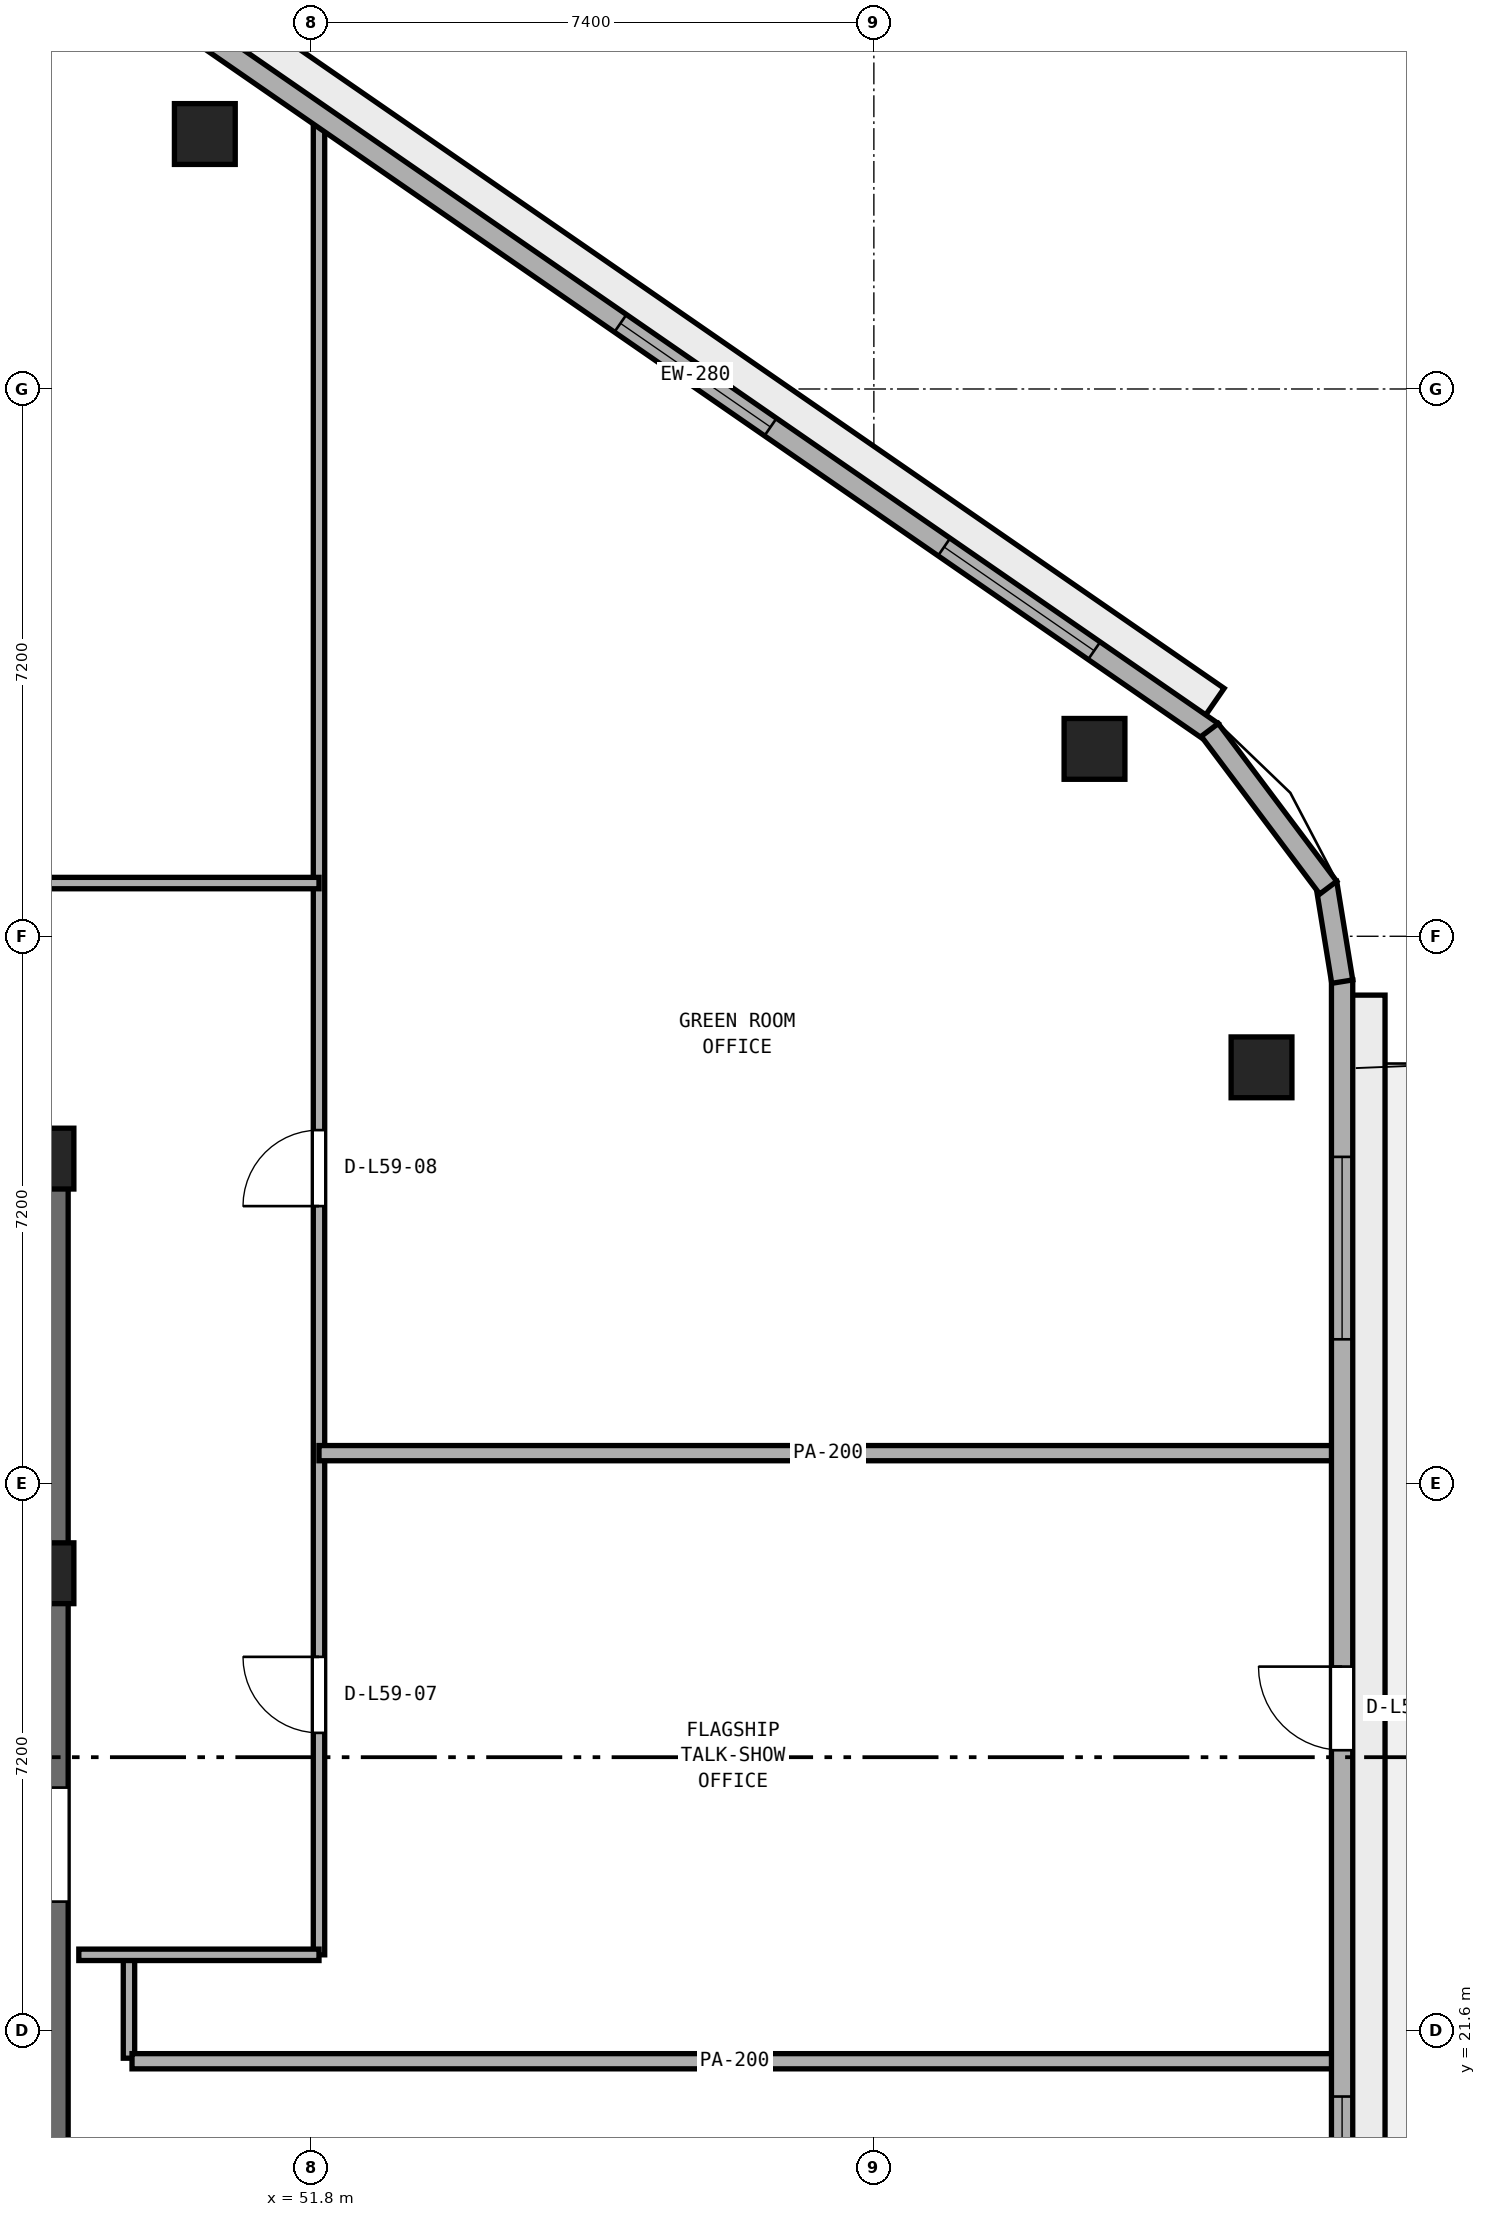
"""IFC4 building model, lengths in metres.
Left out: names, types, materials, properties, quantities, classifications, styles, units other than length and angle.
Written with IfcOpenShell. Run it as: python <this file> out.ifc"""

import sys

from ifc_helpers import new_model, si_unit, direction, frame, frame_2d, origin, origin_2d, place, context, subcontext, project, spatial, rectangle, extrude, element, fill, save


model = new_model("IFC4")
c1 = context("Model", 3, precision=1e-05, world=origin(), true_north=direction((0.0, 1.0)))
c2 = subcontext(c1, "Body", "Model", "MODEL_VIEW")
j1 = project(units=[si_unit("LENGTHUNIT", "METRE"), si_unit("PLANEANGLEUNIT", "RADIAN")], contexts=[c1])
p1 = place(None, origin())
s1 = spatial("IfcSite", under=j1, at=p1, CompositionType="ELEMENT")
p2 = place(p1, origin())
s2 = spatial("IfcBuilding", under=s1, at=p2, CompositionType="ELEMENT")
p3 = place(p2, frame((0.0, 0.0, 232.6)))
s3 = spatial("IfcBuildingStorey", under=s2, at=p3, CompositionType="ELEMENT", Elevation=232.6)
p4 = place(p3, frame((25.4, 33.175, 0.0), z_axis=(0.0, 0.0, 1.0), x_axis=(1.0, 0.0, 0.0)))
e1 = element("IfcWall", 1, at=p4, inside=s3, PredefinedType="SHEAR", context=c2, shape_type="SweptSolid", body=[
    extrude(rectangle(XDim=23.2, YDim=0.45, at=frame_2d((11.6, 0.0))), origin(), (0.0, 0.0, 1.0), 3.51),
])
p5 = place(p3, frame((48.375, 17.45, 0.0), z_axis=(0.0, 0.0, 1.0), x_axis=(0.0, 1.0, 0.0)))
e2 = element("IfcWall", 2, at=p5, inside=s3, PredefinedType="SHEAR", context=c2, shape_type="SweptSolid", body=[
    extrude(rectangle(XDim=15.5, YDim=0.45, at=frame_2d((7.75, 0.0))), origin(), (0.0, 0.0, 1.0), 3.51),
])
p6 = place(p5, frame((5.85, 0.0, 0.0)))
e3 = element("IfcOpeningElement", 3, at=p6, cuts=e2, PredefinedType="OPENING", context=c2, shape_type="SweptSolid", body=[
    extrude(rectangle(XDim=1.5, YDim=2.15, at=frame_2d((0.75, 1.075))), frame((0.0, 0.235, 0.0), z_axis=(0.0, -1.0, 0.0), x_axis=(1.0, 0.0, 0.0)), (0.0, 0.0, 1.0), 0.47),
])
for number, where, z_axis, x_axis in (
    (4, (48.275, 27.62, 0.0), (0.0, 0.0, 1.0), (1.0, 0.0, 0.0)),
    (5, (48.275, 33.075, 0.0), (0.0, 0.0, 1.0), (1.0, 0.0, 0.0)),
):
    element("IfcColumn", number, at=place(p3, frame(where, z_axis=z_axis, x_axis=x_axis)), inside=s3, PredefinedType="PILASTER", context=c2, shape_type="SweptSolid", body=[
        extrude(rectangle(XDim=0.8, YDim=0.8, at=origin_2d()), origin(), (0.0, 0.0, 1.0), 3.8),
    ])
for number, where, z_axis, x_axis in (
    (6, (64.3, 34.276, 0.0), (0.0, 0.0, 1.0), (1.0, 0.0, 0.0)),
    (7, (62.103, 38.465, 0.0), (0.0, 0.0, 1.0), (1.0, 0.0, 0.0)),
    (8, (50.398, 46.554, 0.0), (0.0, 0.0, 1.0), (1.0, 0.0, 0.0)),
):
    element("IfcColumn", number, at=place(p3, frame(where, z_axis=z_axis, x_axis=x_axis)), inside=s3, PredefinedType="COLUMN", context=c2, shape_type="SweptSolid", body=[
        extrude(rectangle(XDim=0.8, YDim=0.8, at=origin_2d()), origin(), (0.0, 0.0, 1.0), 3.8),
    ])
p7 = place(p3, frame((51.9, 22.6, 0.0), z_axis=(0.0, 0.0, 1.0), x_axis=(0.0, 1.0, 0.0)))
e9 = element("IfcWall", 9, at=p7, inside=s3, PredefinedType="PARTITIONING", context=c2, shape_type="SweptSolid", body=[
    extrude(rectangle(XDim=24.235, YDim=0.15, at=frame_2d((12.117, 0.0))), origin(), (0.0, 0.0, 1.0), 3.51),
])
p8 = place(p7, frame((2.92, 0.0, 0.0)))
e10 = element("IfcOpeningElement", 10, at=p8, cuts=e9, PredefinedType="OPENING", context=c2, shape_type="SweptSolid", body=[
    extrude(rectangle(XDim=1.0, YDim=2.12, at=frame_2d((0.5, 1.06))), frame((0.0, 0.085, 0.0), z_axis=(0.0, -1.0, 0.0), x_axis=(1.0, 0.0, 0.0)), (0.0, 0.0, 1.0), 0.17),
])
p9 = place(p7, frame((9.85, 0.0, 0.0)))
e11 = element("IfcOpeningElement", 11, at=p9, cuts=e9, PredefinedType="OPENING", context=c2, shape_type="SweptSolid", body=[
    extrude(rectangle(XDim=1.0, YDim=2.12, at=frame_2d((0.5, 1.06))), frame((0.0, 0.085, 0.0), z_axis=(0.0, -1.0, 0.0), x_axis=(1.0, 0.0, 0.0)), (0.0, 0.0, 1.0), 0.17),
])
p10 = place(p3, frame((49.4, 21.24, 0.0), z_axis=(0.0, 0.0, 1.0), x_axis=(0.0, 1.0, 0.0)))
e12 = element("IfcWall", 12, at=p10, inside=s3, PredefinedType="PARTITIONING", context=c2, shape_type="SweptSolid", body=[
    extrude(rectangle(XDim=1.359, YDim=0.15, at=frame_2d((0.68, 0.0))), origin(), (0.0, 0.0, 1.0), 3.51),
])
p11 = place(p3, frame((49.44, 21.2, 0.0), z_axis=(0.0, 0.0, 1.0), x_axis=(1.0, 0.0, 0.0)))
e13 = element("IfcWall", 13, at=p11, inside=s3, PredefinedType="PARTITIONING", context=c2, shape_type="SweptSolid", body=[
    extrude(rectangle(XDim=15.855, YDim=0.2, at=frame_2d((7.927, 0.0))), origin(), (0.0, 0.0, 1.0), 3.51),
])
p12 = place(p3, frame((48.74, 22.6, 0.0), z_axis=(0.0, 0.0, 1.0), x_axis=(1.0, 0.0, 0.0)))
e14 = element("IfcWall", 14, at=p12, inside=s3, PredefinedType="PARTITIONING", context=c2, shape_type="SweptSolid", body=[
    extrude(rectangle(XDim=3.16, YDim=0.15, at=frame_2d((1.58, 0.0))), origin(), (0.0, 0.0, 1.0), 3.51),
])
p13 = place(p3, frame((51.9, 29.2, 0.0), z_axis=(0.0, 0.0, 1.0), x_axis=(1.0, 0.0, 0.0)))
e15 = element("IfcWall", 15, at=p13, inside=s3, PredefinedType="PARTITIONING", context=c2, shape_type="SweptSolid", body=[
    extrude(rectangle(XDim=13.395, YDim=0.2, at=frame_2d((6.698, 0.0))), origin(), (0.0, 0.0, 1.0), 3.51),
])
p14 = place(p3, frame((38.35, 36.7, 0.0), z_axis=(0.0, 0.0, 1.0), x_axis=(1.0, 0.0, 0.0)))
e16 = element("IfcWall", 16, at=p14, inside=s3, PredefinedType="PARTITIONING", context=c2, shape_type="SweptSolid", body=[
    extrude(rectangle(XDim=13.55, YDim=0.15, at=frame_2d((6.775, 0.0))), origin(), (0.0, 0.0, 1.0), 3.51),
])
p15 = place(p14, frame((6.275, 0.0, 0.0)))
e17 = element("IfcOpeningElement", 17, at=p15, cuts=e16, PredefinedType="OPENING", context=c2, shape_type="SweptSolid", body=[
    extrude(rectangle(XDim=1.0, YDim=2.12, at=frame_2d((0.5, 1.06))), frame((0.0, 0.085, 0.0), z_axis=(0.0, -1.0, 0.0), x_axis=(1.0, 0.0, 0.0)), (0.0, 0.0, 1.0), 0.17),
])
p16 = place(p3, frame((65.36, 16.258, 0.0), z_axis=(0.0, 0.0, 1.0), x_axis=(0.0, 1.0, 0.0)))
e18 = element("IfcWall", 18, at=p16, inside=s3, PredefinedType="STANDARD", context=c2, shape_type="SweptSolid", body=[
    extrude(rectangle(XDim=19.168, YDim=0.28, at=frame_2d((9.584, 0.0))), origin(), (0.0, 0.0, 1.0), 3.51),
])
p17 = place(p16, frame((9.034, 0.0, 0.0)))
e19 = element("IfcOpeningElement", 19, at=p17, cuts=e18, PredefinedType="OPENING", context=c2, shape_type="SweptSolid", body=[
    extrude(rectangle(XDim=1.1, YDim=2.2, at=frame_2d((0.55, 1.1))), frame((0.0, 0.15, 0.0), z_axis=(0.0, -1.0, 0.0), x_axis=(1.0, 0.0, 0.0)), (0.0, 0.0, 1.0), 0.3),
])
p18 = place(p16, frame((2.078, 0.0, 0.9)))
e20 = element("IfcOpeningElement", 20, at=p18, cuts=e18, PredefinedType="OPENING", context=c2, shape_type="SweptSolid", body=[
    extrude(rectangle(XDim=2.4, YDim=1.75, at=frame_2d((1.2, 0.875))), frame((0.0, 0.15, 0.0), z_axis=(0.0, -1.0, 0.0), x_axis=(1.0, 0.0, 0.0)), (0.0, 0.0, 1.0), 0.3),
])
p19 = place(p16, frame((14.44, 0.0, 0.9)))
e21 = element("IfcOpeningElement", 21, at=p19, cuts=e18, PredefinedType="OPENING", context=c2, shape_type="SweptSolid", body=[
    extrude(rectangle(XDim=2.4, YDim=1.75, at=frame_2d((1.2, 0.875))), frame((0.0, 0.15, 0.0), z_axis=(0.0, -1.0, 0.0), x_axis=(1.0, 0.0, 0.0)), (0.0, 0.0, 1.0), 0.3),
])
p20 = place(p3, frame((63.651, 38.683, 0.0), z_axis=(0.0, 0.0, 1.0), x_axis=(-0.822655095, 0.568540759022, 0.0)))
e22 = element("IfcWall", 22, at=p20, inside=s3, PredefinedType="STANDARD", context=c2, shape_type="SweptSolid", body=[
    extrude(rectangle(XDim=16.528, YDim=0.28, at=frame_2d((8.264, 0.0))), origin(), (0.0, 0.0, 1.0), 3.51),
])
p21 = place(p20, frame((1.888, 0.0, 0.9)))
e23 = element("IfcOpeningElement", 23, at=p21, cuts=e22, PredefinedType="OPENING", context=c2, shape_type="SweptSolid", body=[
    extrude(rectangle(XDim=2.4, YDim=1.75, at=frame_2d((1.2, 0.875))), frame((0.0, 0.15, 0.0), z_axis=(0.0, -1.0, 0.0), x_axis=(1.0, 0.0, 0.0)), (0.0, 0.0, 1.0), 0.3),
])
p22 = place(p20, frame((7.064, 0.0, 0.9)))
e24 = element("IfcOpeningElement", 24, at=p22, cuts=e22, PredefinedType="OPENING", context=c2, shape_type="SweptSolid", body=[
    extrude(rectangle(XDim=2.4, YDim=1.75, at=frame_2d((1.2, 0.875))), frame((0.0, 0.15, 0.0), z_axis=(0.0, -1.0, 0.0), x_axis=(1.0, 0.0, 0.0)), (0.0, 0.0, 1.0), 0.3),
])
p23 = place(p3, frame((65.362, 35.403, 0.0), z_axis=(0.0, 0.0, 1.0), x_axis=(-0.160271674114, 0.987072940809, 0.0)))
e25 = element("IfcWall", 25, at=p23, inside=s3, PredefinedType="STANDARD", context=c2, shape_type="SweptSolid", body=[
    extrude(rectangle(XDim=1.315, YDim=0.28, at=frame_2d((0.657, 0.0))), origin(), (0.0, 0.0, 1.0), 3.51),
])
p24 = place(p3, frame((65.177, 36.639, 0.0), z_axis=(0.0, 0.0, 1.0), x_axis=(-0.600436386467, 0.799672524104, 0.0)))
e26 = element("IfcWall", 26, at=p24, inside=s3, PredefinedType="STANDARD", context=c2, shape_type="SweptSolid", body=[
    extrude(rectangle(XDim=2.595, YDim=0.28, at=frame_2d((1.298, 0.0))), origin(), (0.0, 0.0, 1.0), 3.51),
])
p25 = place(p6, origin())
e27 = element("IfcDoor", 27, at=p25, inside=s3, OperationType="DOUBLE_DOOR_SINGLE_SWING", PredefinedType="DOOR", context=c2, shape_type="SweptSolid", body=[
    extrude(rectangle(XDim=1.5, YDim=2.15, at=frame_2d((0.75, 1.075))), frame((0.0, 0.025, 0.0), z_axis=(0.0, -1.0, 0.0), x_axis=(1.0, 0.0, 0.0)), (0.0, 0.0, 1.0), 0.05),
])
fill(e3, e27)
p26 = place(p8, origin())
e28 = element("IfcDoor", 28, at=p26, inside=s3, OperationType="SINGLE_SWING_RIGHT", PredefinedType="DOOR", context=c2, shape_type="SweptSolid", body=[
    extrude(rectangle(XDim=1.0, YDim=2.12, at=frame_2d((0.5, 1.06))), frame((0.0, 0.025, 0.0), z_axis=(0.0, -1.0, 0.0), x_axis=(1.0, 0.0, 0.0)), (0.0, 0.0, 1.0), 0.05),
])
fill(e10, e28)
p27 = place(p9, origin())
e29 = element("IfcDoor", 29, at=p27, inside=s3, OperationType="SINGLE_SWING_LEFT", PredefinedType="DOOR", context=c2, shape_type="SweptSolid", body=[
    extrude(rectangle(XDim=1.0, YDim=2.12, at=frame_2d((0.5, 1.06))), frame((0.0, 0.025, 0.0), z_axis=(0.0, -1.0, 0.0), x_axis=(1.0, 0.0, 0.0)), (0.0, 0.0, 1.0), 0.05),
])
fill(e11, e29)
p28 = place(p17, origin())
e30 = element("IfcDoor", 30, at=p28, inside=s3, OperationType="SINGLE_SWING_RIGHT", PredefinedType="DOOR", context=c2, shape_type="SweptSolid", body=[
    extrude(rectangle(XDim=1.1, YDim=2.2, at=frame_2d((0.55, 1.1))), frame((0.0, 0.025, 0.0), z_axis=(0.0, -1.0, 0.0), x_axis=(1.0, 0.0, 0.0)), (0.0, 0.0, 1.0), 0.05),
])
fill(e19, e30)
p29 = place(p18, origin())
e31 = element("IfcWindow", 31, at=p29, inside=s3, PartitioningType="SINGLE_PANEL", PredefinedType="WINDOW", context=c2, shape_type="SweptSolid", body=[
    extrude(rectangle(XDim=2.4, YDim=1.75, at=frame_2d((1.2, 0.875))), frame((0.0, 0.03, 0.0), z_axis=(0.0, -1.0, 0.0), x_axis=(1.0, 0.0, 0.0)), (0.0, 0.0, 1.0), 0.06),
])
fill(e20, e31)
p30 = place(p19, origin())
e32 = element("IfcWindow", 32, at=p30, inside=s3, PartitioningType="SINGLE_PANEL", PredefinedType="WINDOW", context=c2, shape_type="SweptSolid", body=[
    extrude(rectangle(XDim=2.4, YDim=1.75, at=frame_2d((1.2, 0.875))), frame((0.0, 0.03, 0.0), z_axis=(0.0, -1.0, 0.0), x_axis=(1.0, 0.0, 0.0)), (0.0, 0.0, 1.0), 0.06),
])
fill(e21, e32)
p31 = place(p21, origin())
e33 = element("IfcWindow", 33, at=p31, inside=s3, PartitioningType="SINGLE_PANEL", PredefinedType="WINDOW", context=c2, shape_type="SweptSolid", body=[
    extrude(rectangle(XDim=2.4, YDim=1.75, at=frame_2d((1.2, 0.875))), frame((0.0, 0.03, 0.0), z_axis=(0.0, -1.0, 0.0), x_axis=(1.0, 0.0, 0.0)), (0.0, 0.0, 1.0), 0.06),
])
fill(e23, e33)
p32 = place(p22, origin())
e34 = element("IfcWindow", 34, at=p32, inside=s3, PartitioningType="SINGLE_PANEL", PredefinedType="WINDOW", context=c2, shape_type="SweptSolid", body=[
    extrude(rectangle(XDim=2.4, YDim=1.75, at=frame_2d((1.2, 0.875))), frame((0.0, 0.03, 0.0), z_axis=(0.0, -1.0, 0.0), x_axis=(1.0, 0.0, 0.0)), (0.0, 0.0, 1.0), 0.06),
])
fill(e24, e34)
save(model, sys.argv[1])
